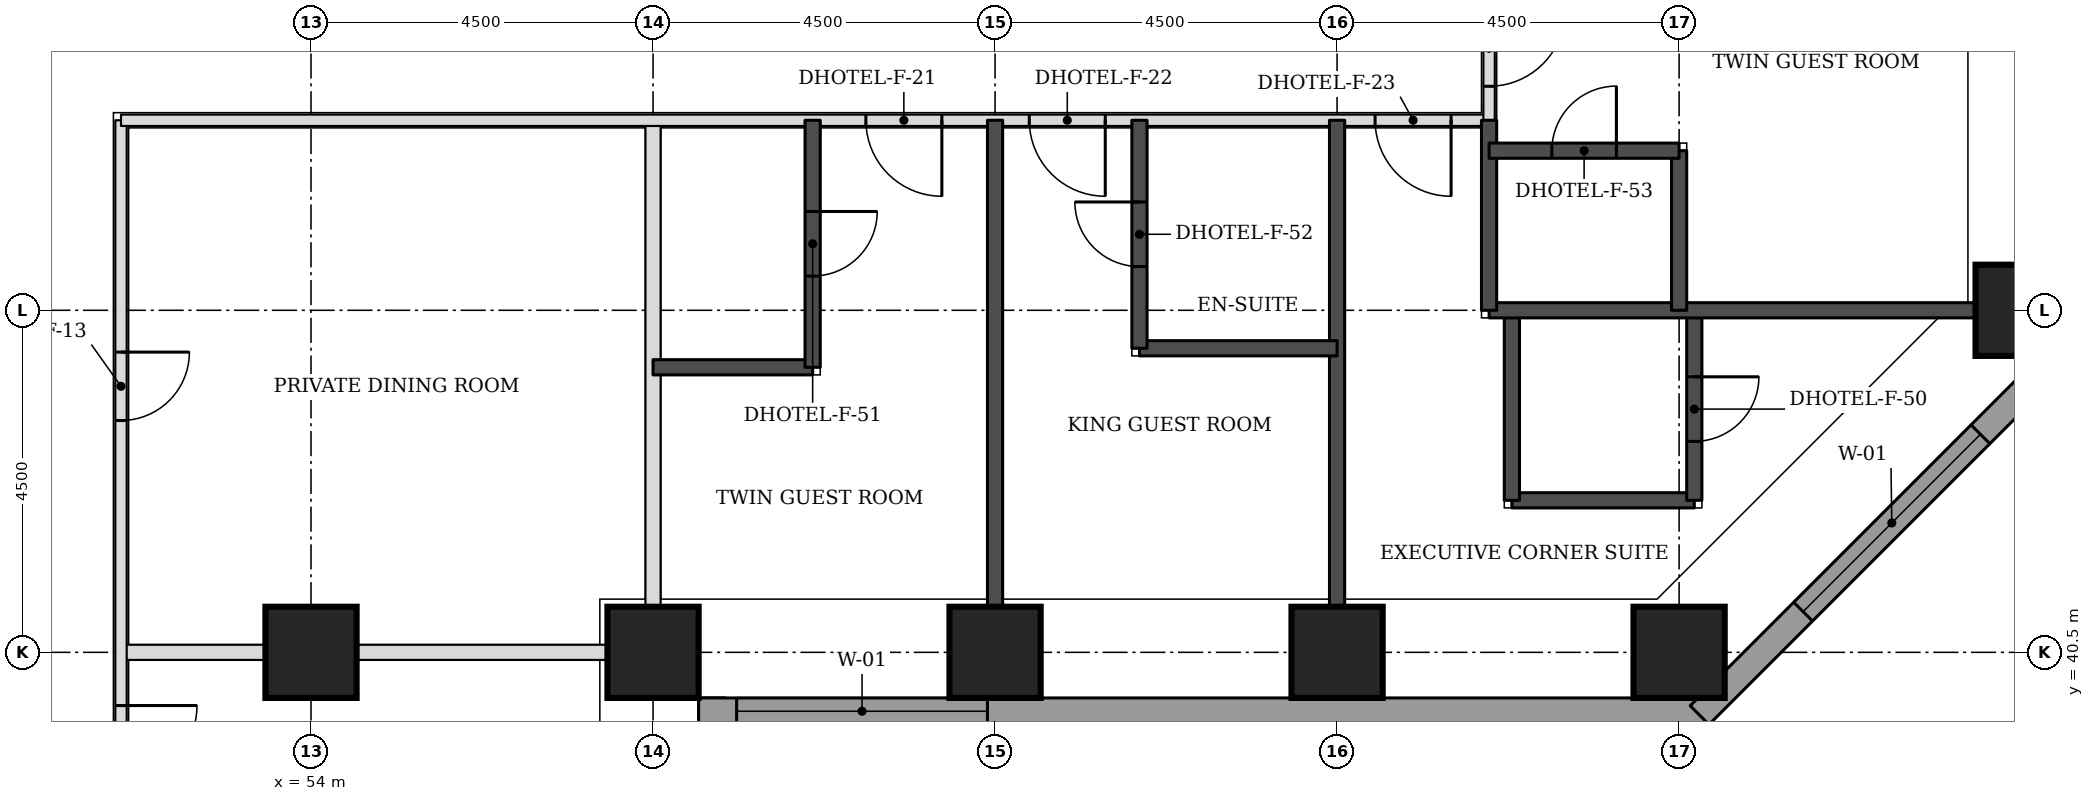
"""IFC4 building model, lengths in metres.
Left out: names, types, materials, properties, quantities, classifications, styles, units other than length and angle.
Written with IfcOpenShell. Run it as: python <this file> out.ifc"""

import sys

from ifc_helpers import new_model, si_unit, direction, frame, frame_2d, origin, origin_2d, place, context, subcontext, project, spatial, rectangle, extrude, element, fill, save


model = new_model("IFC4")
c1 = context("Model", 3, precision=1e-05, world=origin(), true_north=direction((0.0, 1.0)))
c2 = subcontext(c1, "Body", "Model", "MODEL_VIEW")
j1 = project(units=[si_unit("LENGTHUNIT", "METRE"), si_unit("PLANEANGLEUNIT", "RADIAN")], contexts=[c1])
p1 = place(None, origin())
s1 = spatial("IfcSite", under=j1, at=p1, CompositionType="ELEMENT")
p2 = place(p1, origin())
s2 = spatial("IfcBuilding", under=s1, at=p2, CompositionType="ELEMENT")
p3 = place(p2, frame((0.0, 0.0, 42.9)))
s3 = spatial("IfcBuildingStorey", under=s2, at=p3, CompositionType="ELEMENT", Elevation=42.9)
for number, where, z_axis, x_axis in (
    (1, (54.0, 40.5, 0.0), (0.0, 0.0, 1.0), (1.0, 0.0, 0.0)),
    (2, (58.5, 40.5, 0.0), (0.0, 0.0, 1.0), (1.0, 0.0, 0.0)),
    (3, (63.0, 40.5, 0.0), (0.0, 0.0, 1.0), (1.0, 0.0, 0.0)),
    (4, (67.5, 40.5, 0.0), (0.0, 0.0, 1.0), (1.0, 0.0, 0.0)),
    (5, (72.0, 40.5, 0.0), (0.0, 0.0, 1.0), (1.0, 0.0, 0.0)),
    (6, (76.5, 45.0, 0.0), (0.0, 0.0, 1.0), (1.0, 0.0, 0.0)),
):
    element("IfcColumn", number, at=place(p3, frame(where, z_axis=z_axis, x_axis=x_axis)), inside=s3, PredefinedType="COLUMN", context=c2, shape_type="SweptSolid", body=[
        extrude(rectangle(XDim=1.2, YDim=1.2, at=origin_2d()), origin(), (0.0, 0.0, 1.0), 3.3),
    ])
p4 = place(p3, frame((59.275, 22.106, 0.0), z_axis=(0.0, 0.0, 1.0), x_axis=(0.0, 1.0, 0.0)))
e7 = element("IfcWall", 7, at=p4, inside=s3, PredefinedType="STANDARD", context=c2, shape_type="SweptSolid", body=[
    extrude(rectangle(XDim=17.793, YDim=0.35, at=frame_2d((8.897, 0.0))), origin(), (0.0, 0.0, 1.0), 3.055),
])
p5 = place(p4, frame((5.493, 0.0, 0.8)))
e8 = element("IfcOpeningElement", 8, at=p5, cuts=e7, PredefinedType="OPENING", context=c2, shape_type="SweptSolid", body=[
    extrude(rectangle(XDim=3.3, YDim=1.5, at=frame_2d((1.65, 0.75))), frame((0.0, 0.185, 0.0), z_axis=(0.0, -1.0, 0.0), x_axis=(1.0, 0.0, 0.0)), (0.0, 0.0, 1.0), 0.37),
])
p6 = place(p4, frame((13.993, 0.0, 0.8)))
e9 = element("IfcOpeningElement", 9, at=p6, cuts=e7, PredefinedType="OPENING", context=c2, shape_type="SweptSolid", body=[
    extrude(rectangle(XDim=3.3, YDim=1.5, at=frame_2d((1.65, 0.75))), frame((0.0, 0.185, 0.0), z_axis=(0.0, -1.0, 0.0), x_axis=(1.0, 0.0, 0.0)), (0.0, 0.0, 1.0), 0.37),
])
p7 = place(p3, frame((59.1, 39.725, 0.0), z_axis=(0.0, 0.0, 1.0), x_axis=(1.0, 0.0, 0.0)))
e10 = element("IfcWall", 10, at=p7, inside=s3, PredefinedType="STANDARD", context=c2, shape_type="SweptSolid", body=[
    extrude(rectangle(XDim=13.293, YDim=0.35, at=frame_2d((6.647, 0.0))), origin(), (0.0, 0.0, 1.0), 3.055),
])
p8 = place(p7, frame((0.5, 0.0, 0.8)))
e11 = element("IfcOpeningElement", 11, at=p8, cuts=e10, PredefinedType="OPENING", context=c2, shape_type="SweptSolid", body=[
    extrude(rectangle(XDim=3.3, YDim=1.5, at=frame_2d((1.65, 0.75))), frame((0.0, 0.185, 0.0), z_axis=(0.0, -1.0, 0.0), x_axis=(1.0, 0.0, 0.0)), (0.0, 0.0, 1.0), 0.37),
])
p9 = place(p3, frame((72.27, 39.674, 0.0), z_axis=(0.0, 0.0, 1.0), x_axis=(0.707106781187, 0.707106781187, 0.0)))
e12 = element("IfcWall", 12, at=p9, inside=s3, PredefinedType="STANDARD", context=c2, shape_type="SweptSolid", body=[
    extrude(rectangle(XDim=7.151, YDim=0.35, at=frame_2d((3.576, 0.0))), origin(), (0.0, 0.0, 1.0), 3.055),
])
p10 = place(p9, frame((1.926, 0.0, 0.8)))
e13 = element("IfcOpeningElement", 13, at=p10, cuts=e12, PredefinedType="OPENING", context=c2, shape_type="SweptSolid", body=[
    extrude(rectangle(XDim=3.3, YDim=1.5, at=frame_2d((1.65, 0.75))), frame((0.0, 0.185, 0.0), z_axis=(0.0, -1.0, 0.0), x_axis=(1.0, 0.0, 0.0)), (0.0, 0.0, 1.0), 0.37),
])
p11 = place(p3, frame((51.5, 40.5, 0.0), z_axis=(0.0, 0.0, 1.0), x_axis=(1.0, 0.0, 0.0)))
e14 = element("IfcWall", 14, at=p11, inside=s3, PredefinedType="PARTITIONING", context=c2, shape_type="SweptSolid", body=[
    extrude(rectangle(XDim=6.4, YDim=0.2, at=frame_2d((3.2, 0.0))), origin(), (0.0, 0.0, 1.0), 2.33),
])
p12 = place(p3, frame((58.5, 41.1, 0.0), z_axis=(0.0, 0.0, 1.0), x_axis=(0.0, 1.0, 0.0)))
e15 = element("IfcWall", 15, at=p12, inside=s3, PredefinedType="PARTITIONING", context=c2, shape_type="SweptSolid", body=[
    extrude(rectangle(XDim=6.4, YDim=0.2, at=frame_2d((3.2, 0.0))), origin(), (0.0, 0.0, 1.0), 3.08),
])
p13 = place(p3, frame((51.5, 23.65, 0.0), z_axis=(0.0, 0.0, 1.0), x_axis=(0.0, 1.0, 0.0)))
e16 = element("IfcWall", 16, at=p13, inside=s3, PredefinedType="PARTITIONING", context=c2, shape_type="SweptSolid", body=[
    extrude(rectangle(XDim=23.85, YDim=0.15, at=frame_2d((11.925, 0.0))), origin(), (0.0, 0.0, 1.0), 3.08),
])
p14 = place(p13, frame((1.65, 0.0, 0.0)))
e17 = element("IfcOpeningElement", 17, at=p14, cuts=e16, PredefinedType="OPENING", context=c2, shape_type="SweptSolid", body=[
    extrude(rectangle(XDim=1.0, YDim=2.1, at=frame_2d((0.5, 1.05))), frame((0.0, 0.085, 0.0), z_axis=(0.0, -1.0, 0.0), x_axis=(1.0, 0.0, 0.0)), (0.0, 0.0, 1.0), 0.17),
])
p15 = place(p13, frame((5.75, 0.0, 0.0)))
e18 = element("IfcOpeningElement", 18, at=p15, cuts=e16, PredefinedType="OPENING", context=c2, shape_type="SweptSolid", body=[
    extrude(rectangle(XDim=1.0, YDim=2.1, at=frame_2d((0.5, 1.05))), frame((0.0, 0.085, 0.0), z_axis=(0.0, -1.0, 0.0), x_axis=(1.0, 0.0, 0.0)), (0.0, 0.0, 1.0), 0.17),
])
p16 = place(p13, frame((15.15, 0.0, 0.0)))
e19 = element("IfcOpeningElement", 19, at=p16, cuts=e16, PredefinedType="OPENING", context=c2, shape_type="SweptSolid", body=[
    extrude(rectangle(XDim=1.0, YDim=2.1, at=frame_2d((0.5, 1.05))), frame((0.0, 0.085, 0.0), z_axis=(0.0, -1.0, 0.0), x_axis=(1.0, 0.0, 0.0)), (0.0, 0.0, 1.0), 0.17),
])
p17 = place(p13, frame((19.9, 0.0, 0.0)))
e20 = element("IfcOpeningElement", 20, at=p17, cuts=e16, PredefinedType="OPENING", context=c2, shape_type="SweptSolid", body=[
    extrude(rectangle(XDim=0.9, YDim=2.1, at=frame_2d((0.45, 1.05))), frame((0.0, 0.085, 0.0), z_axis=(0.0, -1.0, 0.0), x_axis=(1.0, 0.0, 0.0)), (0.0, 0.0, 1.0), 0.17),
])
p18 = place(p3, frame((51.5, 47.5, 0.0), z_axis=(0.0, 0.0, 1.0), x_axis=(1.0, 0.0, 0.0)))
e21 = element("IfcWall", 21, at=p18, inside=s3, PredefinedType="PARTITIONING", context=c2, shape_type="SweptSolid", body=[
    extrude(rectangle(XDim=18.0, YDim=0.15, at=frame_2d((9.0, 0.0))), origin(), (0.0, 0.0, 1.0), 3.08),
])
p19 = place(p18, frame((11.95, 0.0, 0.0)))
e22 = element("IfcOpeningElement", 22, at=p19, cuts=e21, PredefinedType="OPENING", context=c2, shape_type="SweptSolid", body=[
    extrude(rectangle(XDim=1.0, YDim=2.1, at=frame_2d((0.5, 1.05))), frame((0.0, 0.085, 0.0), z_axis=(0.0, -1.0, 0.0), x_axis=(1.0, 0.0, 0.0)), (0.0, 0.0, 1.0), 0.17),
])
p20 = place(p18, frame((9.8, 0.0, 0.0)))
e23 = element("IfcOpeningElement", 23, at=p20, cuts=e21, PredefinedType="OPENING", context=c2, shape_type="SweptSolid", body=[
    extrude(rectangle(XDim=1.0, YDim=2.1, at=frame_2d((0.5, 1.05))), frame((0.0, 0.085, 0.0), z_axis=(0.0, -1.0, 0.0), x_axis=(1.0, 0.0, 0.0)), (0.0, 0.0, 1.0), 0.17),
])
p21 = place(p18, frame((16.5, 0.0, 0.0)))
e24 = element("IfcOpeningElement", 24, at=p21, cuts=e21, PredefinedType="OPENING", context=c2, shape_type="SweptSolid", body=[
    extrude(rectangle(XDim=1.0, YDim=2.1, at=frame_2d((0.5, 1.05))), frame((0.0, 0.085, 0.0), z_axis=(0.0, -1.0, 0.0), x_axis=(1.0, 0.0, 0.0)), (0.0, 0.0, 1.0), 0.17),
])
p22 = place(p3, frame((69.5, 47.5, 0.0), z_axis=(0.0, 0.0, 1.0), x_axis=(0.0, 1.0, 0.0)))
e25 = element("IfcWall", 25, at=p22, inside=s3, PredefinedType="PARTITIONING", context=c2, shape_type="SweptSolid", body=[
    extrude(rectangle(XDim=26.5, YDim=0.15, at=frame_2d((13.25, 0.0))), origin(), (0.0, 0.0, 1.0), 3.08),
])
p23 = place(p22, frame((25.053, 0.0, 0.0)))
e26 = element("IfcOpeningElement", 26, at=p23, cuts=e25, PredefinedType="OPENING", context=c2, shape_type="SweptSolid", body=[
    extrude(rectangle(XDim=1.0, YDim=2.1, at=frame_2d((0.5, 1.05))), frame((0.0, 0.085, 0.0), z_axis=(0.0, -1.0, 0.0), x_axis=(1.0, 0.0, 0.0)), (0.0, 0.0, 1.0), 0.17),
])
p24 = place(p22, frame((21.1, 0.0, 0.0)))
e27 = element("IfcOpeningElement", 27, at=p24, cuts=e25, PredefinedType="OPENING", context=c2, shape_type="SweptSolid", body=[
    extrude(rectangle(XDim=1.0, YDim=2.1, at=frame_2d((0.5, 1.05))), frame((0.0, 0.085, 0.0), z_axis=(0.0, -1.0, 0.0), x_axis=(1.0, 0.0, 0.0)), (0.0, 0.0, 1.0), 0.17),
])
p25 = place(p22, frame((8.75, 0.0, 0.0)))
e28 = element("IfcOpeningElement", 28, at=p25, cuts=e25, PredefinedType="OPENING", context=c2, shape_type="SweptSolid", body=[
    extrude(rectangle(XDim=1.1, YDim=2.1, at=frame_2d((0.55, 1.05))), frame((0.0, 0.085, 0.0), z_axis=(0.0, -1.0, 0.0), x_axis=(1.0, 0.0, 0.0)), (0.0, 0.0, 1.0), 0.17),
])
p26 = place(p22, frame((5.05, 0.0, 0.0)))
e29 = element("IfcOpeningElement", 29, at=p26, cuts=e25, PredefinedType="OPENING", context=c2, shape_type="SweptSolid", body=[
    extrude(rectangle(XDim=1.0, YDim=2.1, at=frame_2d((0.5, 1.05))), frame((0.0, 0.085, 0.0), z_axis=(0.0, -1.0, 0.0), x_axis=(1.0, 0.0, 0.0)), (0.0, 0.0, 1.0), 0.17),
])
p27 = place(p22, frame((0.447, 0.0, 0.0)))
e30 = element("IfcOpeningElement", 30, at=p27, cuts=e25, PredefinedType="OPENING", context=c2, shape_type="SweptSolid", body=[
    extrude(rectangle(XDim=1.0, YDim=2.1, at=frame_2d((0.5, 1.05))), frame((0.0, 0.085, 0.0), z_axis=(0.0, -1.0, 0.0), x_axis=(1.0, 0.0, 0.0)), (0.0, 0.0, 1.0), 0.17),
])
for number, where, z_axis, x_axis in (
    (31, (63.0, 41.1, 0.0), (0.0, 0.0, 1.0), (0.0, 1.0, 0.0)),
    (32, (67.5, 41.1, 0.0), (0.0, 0.0, 1.0), (0.0, 1.0, 0.0)),
):
    element("IfcWall", number, at=place(p3, frame(where, z_axis=z_axis, x_axis=x_axis)), inside=s3, PredefinedType="SOLIDWALL", context=c2, shape_type="SweptSolid", body=[
        extrude(rectangle(XDim=6.4, YDim=0.2, at=frame_2d((3.2, 0.0))), origin(), (0.0, 0.0, 1.0), 3.08),
    ])
p28 = place(p3, frame((69.8, 42.5, 0.0), z_axis=(0.0, 0.0, 1.0), x_axis=(1.0, 0.0, 0.0)))
e33 = element("IfcWall", 33, at=p28, inside=s3, PredefinedType="SOLIDWALL", context=c2, shape_type="SweptSolid", body=[
    extrude(rectangle(XDim=2.4, YDim=0.2, at=frame_2d((1.2, 0.0))), origin(), (0.0, 0.0, 1.0), 3.08),
])
p29 = place(p3, frame((69.8, 42.5, 0.0), z_axis=(0.0, 0.0, 1.0), x_axis=(0.0, 1.0, 0.0)))
e34 = element("IfcWall", 34, at=p29, inside=s3, PredefinedType="SOLIDWALL", context=c2, shape_type="SweptSolid", body=[
    extrude(rectangle(XDim=2.5, YDim=0.2, at=frame_2d((1.25, 0.0))), origin(), (0.0, 0.0, 1.0), 3.08),
])
p30 = place(p3, frame((72.2, 42.5, 0.0), z_axis=(0.0, 0.0, 1.0), x_axis=(0.0, 1.0, 0.0)))
e35 = element("IfcWall", 35, at=p30, inside=s3, PredefinedType="SOLIDWALL", context=c2, shape_type="SweptSolid", body=[
    extrude(rectangle(XDim=2.5, YDim=0.2, at=frame_2d((1.25, 0.0))), origin(), (0.0, 0.0, 1.0), 3.08),
])
p31 = place(p30, frame((0.775, 0.0, 0.0)))
e36 = element("IfcOpeningElement", 36, at=p31, cuts=e35, PredefinedType="OPENING", context=c2, shape_type="SweptSolid", body=[
    extrude(rectangle(XDim=0.85, YDim=2.1, at=frame_2d((0.425, 1.05))), frame((0.0, 0.11, 0.0), z_axis=(0.0, -1.0, 0.0), x_axis=(1.0, 0.0, 0.0)), (0.0, 0.0, 1.0), 0.22),
])
p32 = place(p3, frame((58.5, 44.25, 0.0), z_axis=(0.0, 0.0, 1.0), x_axis=(1.0, 0.0, 0.0)))
e37 = element("IfcWall", 37, at=p32, inside=s3, PredefinedType="SOLIDWALL", context=c2, shape_type="SweptSolid", body=[
    extrude(rectangle(XDim=2.1, YDim=0.2, at=frame_2d((1.05, 0.0))), origin(), (0.0, 0.0, 1.0), 3.08),
])
p33 = place(p3, frame((60.6, 44.25, 0.0), z_axis=(0.0, 0.0, 1.0), x_axis=(0.0, 1.0, 0.0)))
e38 = element("IfcWall", 38, at=p33, inside=s3, PredefinedType="SOLIDWALL", context=c2, shape_type="SweptSolid", body=[
    extrude(rectangle(XDim=3.25, YDim=0.2, at=frame_2d((1.625, 0.0))), origin(), (0.0, 0.0, 1.0), 3.08),
])
p34 = place(p33, frame((1.2, 0.0, 0.0)))
e39 = element("IfcOpeningElement", 39, at=p34, cuts=e38, PredefinedType="OPENING", context=c2, shape_type="SweptSolid", body=[
    extrude(rectangle(XDim=0.85, YDim=2.1, at=frame_2d((0.425, 1.05))), frame((0.0, 0.11, 0.0), z_axis=(0.0, -1.0, 0.0), x_axis=(1.0, 0.0, 0.0)), (0.0, 0.0, 1.0), 0.22),
])
p35 = place(p3, frame((64.9, 44.5, 0.0), z_axis=(0.0, 0.0, 1.0), x_axis=(1.0, 0.0, 0.0)))
e40 = element("IfcWall", 40, at=p35, inside=s3, PredefinedType="SOLIDWALL", context=c2, shape_type="SweptSolid", body=[
    extrude(rectangle(XDim=2.6, YDim=0.2, at=frame_2d((1.3, 0.0))), origin(), (0.0, 0.0, 1.0), 3.08),
])
p36 = place(p3, frame((64.9, 44.5, 0.0), z_axis=(0.0, 0.0, 1.0), x_axis=(0.0, 1.0, 0.0)))
e41 = element("IfcWall", 41, at=p36, inside=s3, PredefinedType="SOLIDWALL", context=c2, shape_type="SweptSolid", body=[
    extrude(rectangle(XDim=3.0, YDim=0.2, at=frame_2d((1.5, 0.0))), origin(), (0.0, 0.0, 1.0), 3.08),
])
p37 = place(p36, frame((1.075, 0.0, 0.0)))
e42 = element("IfcOpeningElement", 42, at=p37, cuts=e41, PredefinedType="OPENING", context=c2, shape_type="SweptSolid", body=[
    extrude(rectangle(XDim=0.85, YDim=2.1, at=frame_2d((0.425, 1.05))), frame((0.0, 0.11, 0.0), z_axis=(0.0, -1.0, 0.0), x_axis=(1.0, 0.0, 0.0)), (0.0, 0.0, 1.0), 0.22),
])
p38 = place(p3, frame((69.5, 45.0, 0.0), z_axis=(0.0, 0.0, 1.0), x_axis=(1.0, 0.0, 0.0)))
e43 = element("IfcWall", 43, at=p38, inside=s3, PredefinedType="SOLIDWALL", context=c2, shape_type="SweptSolid", body=[
    extrude(rectangle(XDim=6.4, YDim=0.2, at=frame_2d((3.2, 0.0))), origin(), (0.0, 0.0, 1.0), 3.08),
])
p39 = place(p3, frame((69.5, 45.0, 0.0), z_axis=(0.0, 0.0, 1.0), x_axis=(0.0, 1.0, 0.0)))
e44 = element("IfcWall", 44, at=p39, inside=s3, PredefinedType="SOLIDWALL", context=c2, shape_type="SweptSolid", body=[
    extrude(rectangle(XDim=2.5, YDim=0.2, at=frame_2d((1.25, 0.0))), origin(), (0.0, 0.0, 1.0), 3.08),
])
p40 = place(p3, frame((72.0, 45.0, 0.0), z_axis=(0.0, 0.0, 1.0), x_axis=(0.0, 1.0, 0.0)))
e45 = element("IfcWall", 45, at=p40, inside=s3, PredefinedType="SOLIDWALL", context=c2, shape_type="SweptSolid", body=[
    extrude(rectangle(XDim=2.1, YDim=0.2, at=frame_2d((1.05, 0.0))), origin(), (0.0, 0.0, 1.0), 3.08),
])
p41 = place(p3, frame((69.5, 47.1, 0.0), z_axis=(0.0, 0.0, 1.0), x_axis=(1.0, 0.0, 0.0)))
e46 = element("IfcWall", 46, at=p41, inside=s3, PredefinedType="SOLIDWALL", context=c2, shape_type="SweptSolid", body=[
    extrude(rectangle(XDim=2.5, YDim=0.2, at=frame_2d((1.25, 0.0))), origin(), (0.0, 0.0, 1.0), 3.08),
])
p42 = place(p41, frame((0.825, 0.0, 0.0)))
e47 = element("IfcOpeningElement", 47, at=p42, cuts=e46, PredefinedType="OPENING", context=c2, shape_type="SweptSolid", body=[
    extrude(rectangle(XDim=0.85, YDim=2.1, at=frame_2d((0.425, 1.05))), frame((0.0, 0.11, 0.0), z_axis=(0.0, -1.0, 0.0), x_axis=(1.0, 0.0, 0.0)), (0.0, 0.0, 1.0), 0.22),
])
p43 = place(p8, origin())
e48 = element("IfcWindow", 48, at=p43, inside=s3, PartitioningType="SINGLE_PANEL", PredefinedType="WINDOW", context=c2, shape_type="SweptSolid", body=[
    extrude(rectangle(XDim=3.3, YDim=1.5, at=frame_2d((1.65, 0.75))), frame((0.0, 0.085, 0.0), z_axis=(0.0, -1.0, 0.0), x_axis=(1.0, 0.0, 0.0)), (0.0, 0.0, 1.0), 0.06),
])
fill(e11, e48)
p44 = place(p10, origin())
e49 = element("IfcWindow", 49, at=p44, inside=s3, PartitioningType="SINGLE_PANEL", PredefinedType="WINDOW", context=c2, shape_type="SweptSolid", body=[
    extrude(rectangle(XDim=3.3, YDim=1.5, at=frame_2d((1.65, 0.75))), frame((0.0, 0.085, 0.0), z_axis=(0.0, -1.0, 0.0), x_axis=(1.0, 0.0, 0.0)), (0.0, 0.0, 1.0), 0.06),
])
fill(e13, e49)
p45 = place(p16, frame((1.0, 0.0, 0.0), z_axis=(0.0, 0.0, 1.0), x_axis=(-1.0, 0.0, 0.0)))
e50 = element("IfcDoor", 50, at=p45, inside=s3, OperationType="SINGLE_SWING_LEFT", PredefinedType="DOOR", context=c2, shape_type="SweptSolid", body=[
    extrude(rectangle(XDim=1.0, YDim=2.1, at=frame_2d((0.5, 1.05))), frame((0.0, 0.025, 0.0), z_axis=(0.0, -1.0, 0.0), x_axis=(1.0, 0.0, 0.0)), (0.0, 0.0, 1.0), 0.05),
])
fill(e19, e50)
p46 = place(p27, frame((1.0, 0.0, 0.0), z_axis=(0.0, 0.0, 1.0), x_axis=(-1.0, 0.0, 0.0)))
e51 = element("IfcDoor", 51, at=p46, inside=s3, OperationType="SINGLE_SWING_LEFT", PredefinedType="DOOR", context=c2, shape_type="SweptSolid", body=[
    extrude(rectangle(XDim=1.0, YDim=2.1, at=frame_2d((0.5, 1.05))), frame((0.0, 0.025, 0.0), z_axis=(0.0, -1.0, 0.0), x_axis=(1.0, 0.0, 0.0)), (0.0, 0.0, 1.0), 0.05),
])
fill(e30, e51)
p47 = place(p42, origin())
e52 = element("IfcDoor", 52, at=p47, inside=s3, OperationType="SINGLE_SWING_RIGHT", PredefinedType="DOOR", context=c2, shape_type="SweptSolid", body=[
    extrude(rectangle(XDim=0.85, YDim=2.1, at=frame_2d((0.425, 1.05))), frame((0.0, 0.025, 0.0), z_axis=(0.0, -1.0, 0.0), x_axis=(1.0, 0.0, 0.0)), (0.0, 0.0, 1.0), 0.05),
])
fill(e47, e52)
p48 = place(p19, frame((1.0, 0.0, 0.0), z_axis=(0.0, 0.0, 1.0), x_axis=(-1.0, 0.0, 0.0)))
e53 = element("IfcDoor", 53, at=p48, inside=s3, OperationType="SINGLE_SWING_LEFT", PredefinedType="DOOR", context=c2, shape_type="SweptSolid", body=[
    extrude(rectangle(XDim=1.0, YDim=2.1, at=frame_2d((0.5, 1.05))), frame((0.0, 0.025, 0.0), z_axis=(0.0, -1.0, 0.0), x_axis=(1.0, 0.0, 0.0)), (0.0, 0.0, 1.0), 0.05),
])
fill(e22, e53)
p49 = place(p37, origin())
e54 = element("IfcDoor", 54, at=p49, inside=s3, OperationType="SINGLE_SWING_RIGHT", PredefinedType="DOOR", context=c2, shape_type="SweptSolid", body=[
    extrude(rectangle(XDim=0.85, YDim=2.1, at=frame_2d((0.425, 1.05))), frame((0.0, 0.025, 0.0), z_axis=(0.0, -1.0, 0.0), x_axis=(1.0, 0.0, 0.0)), (0.0, 0.0, 1.0), 0.05),
])
fill(e42, e54)
p50 = place(p20, frame((1.0, 0.0, 0.0), z_axis=(0.0, 0.0, 1.0), x_axis=(-1.0, 0.0, 0.0)))
e55 = element("IfcDoor", 55, at=p50, inside=s3, OperationType="SINGLE_SWING_LEFT", PredefinedType="DOOR", context=c2, shape_type="SweptSolid", body=[
    extrude(rectangle(XDim=1.0, YDim=2.1, at=frame_2d((0.5, 1.05))), frame((0.0, 0.025, 0.0), z_axis=(0.0, -1.0, 0.0), x_axis=(1.0, 0.0, 0.0)), (0.0, 0.0, 1.0), 0.05),
])
fill(e23, e55)
p51 = place(p34, frame((0.85, 0.0, 0.0), z_axis=(0.0, 0.0, 1.0), x_axis=(-1.0, 0.0, 0.0)))
e56 = element("IfcDoor", 56, at=p51, inside=s3, OperationType="SINGLE_SWING_LEFT", PredefinedType="DOOR", context=c2, shape_type="SweptSolid", body=[
    extrude(rectangle(XDim=0.85, YDim=2.1, at=frame_2d((0.425, 1.05))), frame((0.0, 0.025, 0.0), z_axis=(0.0, -1.0, 0.0), x_axis=(1.0, 0.0, 0.0)), (0.0, 0.0, 1.0), 0.05),
])
fill(e39, e56)
p52 = place(p21, frame((1.0, 0.0, 0.0), z_axis=(0.0, 0.0, 1.0), x_axis=(-1.0, 0.0, 0.0)))
e57 = element("IfcDoor", 57, at=p52, inside=s3, OperationType="SINGLE_SWING_LEFT", PredefinedType="DOOR", context=c2, shape_type="SweptSolid", body=[
    extrude(rectangle(XDim=1.0, YDim=2.1, at=frame_2d((0.5, 1.05))), frame((0.0, 0.025, 0.0), z_axis=(0.0, -1.0, 0.0), x_axis=(1.0, 0.0, 0.0)), (0.0, 0.0, 1.0), 0.05),
])
fill(e24, e57)
p53 = place(p31, frame((0.85, 0.0, 0.0), z_axis=(0.0, 0.0, 1.0), x_axis=(-1.0, 0.0, 0.0)))
e58 = element("IfcDoor", 58, at=p53, inside=s3, OperationType="SINGLE_SWING_LEFT", PredefinedType="DOOR", context=c2, shape_type="SweptSolid", body=[
    extrude(rectangle(XDim=0.85, YDim=2.1, at=frame_2d((0.425, 1.05))), frame((0.0, 0.025, 0.0), z_axis=(0.0, -1.0, 0.0), x_axis=(1.0, 0.0, 0.0)), (0.0, 0.0, 1.0), 0.05),
])
fill(e36, e58)
p54 = place(p17, frame((0.9, 0.0, 0.0), z_axis=(0.0, 0.0, 1.0), x_axis=(-1.0, 0.0, 0.0)))
e59 = element("IfcDoor", 59, at=p54, inside=s3, OperationType="SINGLE_SWING_LEFT", PredefinedType="DOOR", context=c2, shape_type="SweptSolid", body=[
    extrude(rectangle(XDim=0.9, YDim=2.1, at=frame_2d((0.45, 1.05))), frame((0.0, 0.025, 0.0), z_axis=(0.0, -1.0, 0.0), x_axis=(1.0, 0.0, 0.0)), (0.0, 0.0, 1.0), 0.05),
])
fill(e20, e59)
save(model, sys.argv[1])
